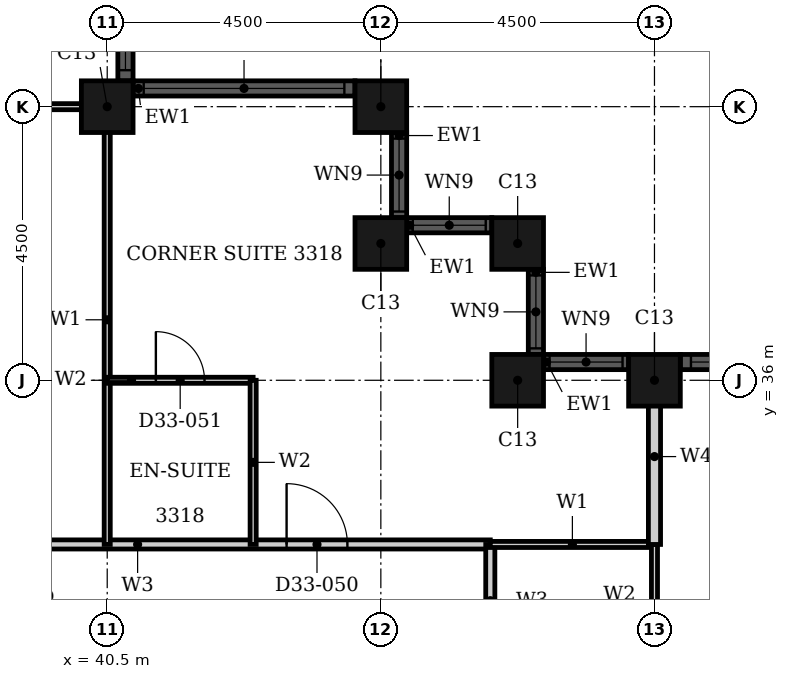
"""IFC4 building model, lengths in metres.
Left out: names, types, materials, properties, quantities, classifications, styles, units other than length and angle.
Written with IfcOpenShell. Run it as: python <this file> out.ifc"""

import sys

from ifc_helpers import new_model, si_unit, direction, frame, frame_2d, origin, origin_2d, place, context, subcontext, project, spatial, rectangle, hollow_rectangle, extrude, element, fill, save


model = new_model("IFC4")
c1 = context("Model", 3, precision=1e-05, world=origin(), true_north=direction((0.0, 1.0)))
c2 = subcontext(c1, "Body", "Model", "MODEL_VIEW")
j1 = project(units=[si_unit("LENGTHUNIT", "METRE"), si_unit("PLANEANGLEUNIT", "RADIAN")], contexts=[c1])
p1 = place(None, origin())
s1 = spatial("IfcSite", under=j1, at=p1, CompositionType="ELEMENT")
p2 = place(p1, origin())
s2 = spatial("IfcBuilding", under=s1, at=p2, CompositionType="ELEMENT")
p3 = place(p2, frame((0.0, 0.0, 133.2)))
s3 = spatial("IfcBuildingStorey", under=s2, at=p3, CompositionType="ELEMENT", Elevation=133.2)
for number, where, z_axis, x_axis in (
    (1, (49.5, 36.0, 0.0), (0.0, 0.0, 1.0), (1.0, 0.0, 0.0)),
    (2, (47.25, 36.0, 0.0), (0.0, 0.0, 1.0), (1.0, 0.0, 0.0)),
    (3, (47.25, 38.25, 0.0), (0.0, 0.0, 1.0), (1.0, 0.0, 0.0)),
    (4, (45.0, 38.25, 0.0), (0.0, 0.0, 1.0), (1.0, 0.0, 0.0)),
    (5, (45.0, 40.5, 0.0), (0.0, 0.0, 1.0), (1.0, 0.0, 0.0)),
    (6, (40.5, 40.5, 0.0), (0.0, 0.0, 1.0), (1.0, 0.0, 0.0)),
):
    element("IfcColumn", number, at=place(p3, frame(where, z_axis=z_axis, x_axis=x_axis)), inside=s3, PredefinedType="COLUMN", context=c2, shape_type="SweptSolid", body=[
        extrude(hollow_rectangle(XDim=0.85, YDim=0.85, WallThickness=0.026, at=origin_2d()), origin(), (0.0, 0.0, 1.0), 3.6),
    ])
p4 = place(p3, frame((58.075, 36.3, 0.0), z_axis=(0.0, 0.0, 1.0), x_axis=(-1.0, 0.0, 0.0)))
e7 = element("IfcWall", 7, at=p4, inside=s3, PredefinedType="SOLIDWALL", context=c2, shape_type="SweptSolid", body=[
    extrude(rectangle(XDim=8.15, YDim=0.25, at=frame_2d((4.075, 0.0))), origin(), (0.0, 0.0, 1.0), 3.6),
])
p5 = place(p4, frame((0.175, 0.0, 0.9)))
e8 = element("IfcOpeningElement", 8, at=p5, cuts=e7, PredefinedType="OPENING", context=c2, shape_type="SweptSolid", body=[
    extrude(rectangle(XDim=3.3, YDim=2.08, at=frame_2d((1.65, 1.04))), frame((0.0, 0.135, 0.0), z_axis=(0.0, -1.0, 0.0), x_axis=(1.0, 0.0, 0.0)), (0.0, 0.0, 1.0), 0.27),
])
p6 = place(p4, frame((4.675, 0.0, 0.9)))
e9 = element("IfcOpeningElement", 9, at=p6, cuts=e7, PredefinedType="OPENING", context=c2, shape_type="SweptSolid", body=[
    extrude(rectangle(XDim=3.3, YDim=2.08, at=frame_2d((1.65, 1.04))), frame((0.0, 0.135, 0.0), z_axis=(0.0, -1.0, 0.0), x_axis=(1.0, 0.0, 0.0)), (0.0, 0.0, 1.0), 0.27),
])
p7 = place(p3, frame((49.075, 36.3, 0.0), z_axis=(0.0, 0.0, 1.0), x_axis=(-1.0, 0.0, 0.0)))
e10 = element("IfcWall", 10, at=p7, inside=s3, PredefinedType="SOLIDWALL", context=c2, shape_type="SweptSolid", body=[
    extrude(rectangle(XDim=1.4, YDim=0.25, at=frame_2d((0.7, 0.0))), origin(), (0.0, 0.0, 1.0), 3.6),
])
p8 = place(p7, frame((0.1, 0.0, 0.9)))
e11 = element("IfcOpeningElement", 11, at=p8, cuts=e10, PredefinedType="OPENING", context=c2, shape_type="SweptSolid", body=[
    extrude(rectangle(XDim=1.2, YDim=2.08, at=frame_2d((0.6, 1.04))), frame((0.0, 0.135, 0.0), z_axis=(0.0, -1.0, 0.0), x_axis=(1.0, 0.0, 0.0)), (0.0, 0.0, 1.0), 0.27),
])
p9 = place(p3, frame((47.55, 36.425, 0.0), z_axis=(0.0, 0.0, 1.0), x_axis=(0.0, 1.0, 0.0)))
e12 = element("IfcWall", 12, at=p9, inside=s3, PredefinedType="SOLIDWALL", context=c2, shape_type="SweptSolid", body=[
    extrude(rectangle(XDim=1.4, YDim=0.25, at=frame_2d((0.7, 0.0))), origin(), (0.0, 0.0, 1.0), 3.6),
])
p10 = place(p9, frame((0.1, 0.0, 0.9)))
e13 = element("IfcOpeningElement", 13, at=p10, cuts=e12, PredefinedType="OPENING", context=c2, shape_type="SweptSolid", body=[
    extrude(rectangle(XDim=1.2, YDim=2.08, at=frame_2d((0.6, 1.04))), frame((0.0, 0.135, 0.0), z_axis=(0.0, -1.0, 0.0), x_axis=(1.0, 0.0, 0.0)), (0.0, 0.0, 1.0), 0.27),
])
p11 = place(p3, frame((46.825, 38.55, 0.0), z_axis=(0.0, 0.0, 1.0), x_axis=(-1.0, 0.0, 0.0)))
e14 = element("IfcWall", 14, at=p11, inside=s3, PredefinedType="SOLIDWALL", context=c2, shape_type="SweptSolid", body=[
    extrude(rectangle(XDim=1.4, YDim=0.25, at=frame_2d((0.7, 0.0))), origin(), (0.0, 0.0, 1.0), 3.6),
])
p12 = place(p11, frame((0.1, 0.0, 0.9)))
e15 = element("IfcOpeningElement", 15, at=p12, cuts=e14, PredefinedType="OPENING", context=c2, shape_type="SweptSolid", body=[
    extrude(rectangle(XDim=1.2, YDim=2.08, at=frame_2d((0.6, 1.04))), frame((0.0, 0.135, 0.0), z_axis=(0.0, -1.0, 0.0), x_axis=(1.0, 0.0, 0.0)), (0.0, 0.0, 1.0), 0.27),
])
p13 = place(p3, frame((45.3, 38.675, 0.0), z_axis=(0.0, 0.0, 1.0), x_axis=(0.0, 1.0, 0.0)))
e16 = element("IfcWall", 16, at=p13, inside=s3, PredefinedType="SOLIDWALL", context=c2, shape_type="SweptSolid", body=[
    extrude(rectangle(XDim=1.4, YDim=0.25, at=frame_2d((0.7, 0.0))), origin(), (0.0, 0.0, 1.0), 3.6),
])
p14 = place(p13, frame((0.1, 0.0, 0.9)))
e17 = element("IfcOpeningElement", 17, at=p14, cuts=e16, PredefinedType="OPENING", context=c2, shape_type="SweptSolid", body=[
    extrude(rectangle(XDim=1.2, YDim=2.08, at=frame_2d((0.6, 1.04))), frame((0.0, 0.135, 0.0), z_axis=(0.0, -1.0, 0.0), x_axis=(1.0, 0.0, 0.0)), (0.0, 0.0, 1.0), 0.27),
])
p15 = place(p3, frame((44.575, 40.8, 0.0), z_axis=(0.0, 0.0, 1.0), x_axis=(-1.0, 0.0, 0.0)))
e18 = element("IfcWall", 18, at=p15, inside=s3, PredefinedType="SOLIDWALL", context=c2, shape_type="SweptSolid", body=[
    extrude(rectangle(XDim=3.65, YDim=0.25, at=frame_2d((1.825, 0.0))), origin(), (0.0, 0.0, 1.0), 3.6),
])
p16 = place(p15, frame((0.175, 0.0, 0.9)))
e19 = element("IfcOpeningElement", 19, at=p16, cuts=e18, PredefinedType="OPENING", context=c2, shape_type="SweptSolid", body=[
    extrude(rectangle(XDim=3.3, YDim=2.08, at=frame_2d((1.65, 1.04))), frame((0.0, 0.135, 0.0), z_axis=(0.0, -1.0, 0.0), x_axis=(1.0, 0.0, 0.0)), (0.0, 0.0, 1.0), 0.27),
])
p17 = place(p3, frame((40.8, 40.925, 0.0), z_axis=(0.0, 0.0, 1.0), x_axis=(0.0, 1.0, 0.0)))
e20 = element("IfcWall", 20, at=p17, inside=s3, PredefinedType="SOLIDWALL", context=c2, shape_type="SweptSolid", body=[
    extrude(rectangle(XDim=8.15, YDim=0.25, at=frame_2d((4.075, 0.0))), origin(), (0.0, 0.0, 1.0), 3.6),
])
p18 = place(p17, frame((0.175, 0.0, 0.9)))
e21 = element("IfcOpeningElement", 21, at=p18, cuts=e20, PredefinedType="OPENING", context=c2, shape_type="SweptSolid", body=[
    extrude(rectangle(XDim=3.3, YDim=2.08, at=frame_2d((1.65, 1.04))), frame((0.0, 0.135, 0.0), z_axis=(0.0, -1.0, 0.0), x_axis=(1.0, 0.0, 0.0)), (0.0, 0.0, 1.0), 0.27),
])
p19 = place(p17, frame((4.675, 0.0, 0.9)))
e22 = element("IfcOpeningElement", 22, at=p19, cuts=e20, PredefinedType="OPENING", context=c2, shape_type="SweptSolid", body=[
    extrude(rectangle(XDim=3.3, YDim=2.08, at=frame_2d((1.65, 1.04))), frame((0.0, 0.135, 0.0), z_axis=(0.0, -1.0, 0.0), x_axis=(1.0, 0.0, 0.0)), (0.0, 0.0, 1.0), 0.27),
])
p20 = place(p3, frame((33.3, 33.3, 0.0), z_axis=(0.0, 0.0, 1.0), x_axis=(1.0, 0.0, 0.0)))
e23 = element("IfcWall", 23, at=p20, inside=s3, PredefinedType="PARTITIONING", context=c2, shape_type="SweptSolid", body=[
    extrude(rectangle(XDim=13.5, YDim=0.15, at=frame_2d((6.75, 0.0))), origin(), (0.0, 0.0, 1.0), 3.3),
])
p21 = place(p20, frame((10.15, 0.0, 0.0)))
e24 = element("IfcOpeningElement", 24, at=p21, cuts=e23, PredefinedType="OPENING", context=c2, shape_type="SweptSolid", body=[
    extrude(rectangle(XDim=1.0, YDim=2.1, at=frame_2d((0.5, 1.05))), frame((0.0, 0.085, 0.0), z_axis=(0.0, -1.0, 0.0), x_axis=(1.0, 0.0, 0.0)), (0.0, 0.0, 1.0), 0.17),
])
p22 = place(p20, frame((0.75, 0.0, 0.0)))
e25 = element("IfcOpeningElement", 25, at=p22, cuts=e23, PredefinedType="OPENING", context=c2, shape_type="SweptSolid", body=[
    extrude(rectangle(XDim=0.9, YDim=2.1, at=frame_2d((0.45, 1.05))), frame((0.0, 0.085, 0.0), z_axis=(0.0, -1.0, 0.0), x_axis=(1.0, 0.0, 0.0)), (0.0, 0.0, 1.0), 0.17),
])
p23 = place(p20, frame((4.35, 0.0, 0.0)))
e26 = element("IfcOpeningElement", 26, at=p23, cuts=e23, PredefinedType="OPENING", context=c2, shape_type="SweptSolid", body=[
    extrude(rectangle(XDim=0.9, YDim=2.1, at=frame_2d((0.45, 1.05))), frame((0.0, 0.085, 0.0), z_axis=(0.0, -1.0, 0.0), x_axis=(1.0, 0.0, 0.0)), (0.0, 0.0, 1.0), 0.17),
])
p24 = place(p3, frame((46.8, 28.8, 0.0), z_axis=(0.0, 0.0, 1.0), x_axis=(0.0, 1.0, 0.0)))
e27 = element("IfcWall", 27, at=p24, inside=s3, PredefinedType="PARTITIONING", context=c2, shape_type="SweptSolid", body=[
    extrude(rectangle(XDim=4.5, YDim=0.15, at=frame_2d((2.25, 0.0))), origin(), (0.0, 0.0, 1.0), 3.3),
])
p25 = place(p24, frame((1.75, 0.0, 0.0)))
e28 = element("IfcOpeningElement", 28, at=p25, cuts=e27, PredefinedType="OPENING", context=c2, shape_type="SweptSolid", body=[
    extrude(rectangle(XDim=0.9, YDim=2.1, at=frame_2d((0.45, 1.05))), frame((0.0, 0.085, 0.0), z_axis=(0.0, -1.0, 0.0), x_axis=(1.0, 0.0, 0.0)), (0.0, 0.0, 1.0), 0.17),
])
p26 = place(p3, frame((46.8, 33.3, 0.0), z_axis=(0.0, 0.0, 1.0), x_axis=(1.0, 0.0, 0.0)))
e29 = element("IfcWall", 29, at=p26, inside=s3, PredefinedType="PARTITIONING", context=c2, shape_type="SweptSolid", body=[
    extrude(rectangle(XDim=2.7, YDim=0.1, at=frame_2d((1.35, 0.0))), origin(), (0.0, 0.0, 1.0), 3.3),
])
p27 = place(p3, frame((33.3, 40.5, 0.0), z_axis=(0.0, 0.0, 1.0), x_axis=(1.0, 0.0, 0.0)))
e30 = element("IfcWall", 30, at=p27, inside=s3, PredefinedType="PARTITIONING", context=c2, shape_type="SweptSolid", body=[
    extrude(rectangle(XDim=7.39, YDim=0.1, at=frame_2d((3.695, 0.0))), origin(), (0.0, 0.0, 1.0), 2.38),
])
p28 = place(p3, frame((40.5, 33.3, 0.0), z_axis=(0.0, 0.0, 1.0), x_axis=(0.0, 1.0, 0.0)))
e31 = element("IfcWall", 31, at=p28, inside=s3, PredefinedType="PARTITIONING", context=c2, shape_type="SweptSolid", body=[
    extrude(rectangle(XDim=7.39, YDim=0.1, at=frame_2d((3.695, 0.0))), origin(), (0.0, 0.0, 1.0), 3.3),
])
p29 = place(p3, frame((49.5, 28.8, 0.0), z_axis=(0.0, 0.0, 1.0), x_axis=(0.0, 1.0, 0.0)))
e32 = element("IfcWall", 32, at=p29, inside=s3, PredefinedType="PARTITIONING", context=c2, shape_type="SweptSolid", body=[
    extrude(rectangle(XDim=4.5, YDim=0.1, at=frame_2d((2.25, 0.0))), origin(), (0.0, 0.0, 1.0), 2.38),
])
p30 = place(p3, frame((49.5, 33.3, 0.0), z_axis=(0.0, 0.0, 1.0), x_axis=(0.0, 1.0, 0.0)))
e33 = element("IfcWall", 33, at=p30, inside=s3, PredefinedType="PARTITIONING", context=c2, shape_type="SweptSolid", body=[
    extrude(rectangle(XDim=2.89, YDim=0.2, at=frame_2d((1.445, 0.0))), origin(), (0.0, 0.0, 1.0), 2.38),
])
p31 = place(p3, frame((40.5, 36.0, 0.0), z_axis=(0.0, 0.0, 1.0), x_axis=(1.0, 0.0, 0.0)))
e34 = element("IfcWall", 34, at=p31, inside=s3, PredefinedType="PARTITIONING", context=c2, shape_type="SweptSolid", body=[
    extrude(rectangle(XDim=2.4, YDim=0.1, at=frame_2d((1.2, 0.0))), origin(), (0.0, 0.0, 1.0), 3.3),
])
p32 = place(p31, frame((0.8, 0.0, 0.0)))
e35 = element("IfcOpeningElement", 35, at=p32, cuts=e34, PredefinedType="OPENING", context=c2, shape_type="SweptSolid", body=[
    extrude(rectangle(XDim=0.8, YDim=2.1, at=frame_2d((0.4, 1.05))), frame((0.0, 0.06, 0.0), z_axis=(0.0, -1.0, 0.0), x_axis=(1.0, 0.0, 0.0)), (0.0, 0.0, 1.0), 0.12),
])
p33 = place(p3, frame((42.9, 33.3, 0.0), z_axis=(0.0, 0.0, 1.0), x_axis=(0.0, 1.0, 0.0)))
e36 = element("IfcWall", 36, at=p33, inside=s3, PredefinedType="PARTITIONING", context=c2, shape_type="SweptSolid", body=[
    extrude(rectangle(XDim=2.7, YDim=0.1, at=frame_2d((1.35, 0.0))), origin(), (0.0, 0.0, 1.0), 3.3),
])
p34 = place(p6, origin())
e37 = element("IfcWindow", 37, at=p34, inside=s3, PartitioningType="SINGLE_PANEL", PredefinedType="WINDOW", context=c2, shape_type="SweptSolid", body=[
    extrude(rectangle(XDim=3.3, YDim=2.08, at=frame_2d((1.65, 1.04))), frame((0.0, 0.03, 0.0), z_axis=(0.0, -1.0, 0.0), x_axis=(1.0, 0.0, 0.0)), (0.0, 0.0, 1.0), 0.06),
])
fill(e9, e37)
p35 = place(p8, origin())
e38 = element("IfcWindow", 38, at=p35, inside=s3, PartitioningType="SINGLE_PANEL", PredefinedType="WINDOW", context=c2, shape_type="SweptSolid", body=[
    extrude(rectangle(XDim=1.2, YDim=2.08, at=frame_2d((0.6, 1.04))), frame((0.0, 0.03, 0.0), z_axis=(0.0, -1.0, 0.0), x_axis=(1.0, 0.0, 0.0)), (0.0, 0.0, 1.0), 0.06),
])
fill(e11, e38)
p36 = place(p10, origin())
e39 = element("IfcWindow", 39, at=p36, inside=s3, PartitioningType="SINGLE_PANEL", PredefinedType="WINDOW", context=c2, shape_type="SweptSolid", body=[
    extrude(rectangle(XDim=1.2, YDim=2.08, at=frame_2d((0.6, 1.04))), frame((0.0, 0.03, 0.0), z_axis=(0.0, -1.0, 0.0), x_axis=(1.0, 0.0, 0.0)), (0.0, 0.0, 1.0), 0.06),
])
fill(e13, e39)
p37 = place(p12, origin())
e40 = element("IfcWindow", 40, at=p37, inside=s3, PartitioningType="SINGLE_PANEL", PredefinedType="WINDOW", context=c2, shape_type="SweptSolid", body=[
    extrude(rectangle(XDim=1.2, YDim=2.08, at=frame_2d((0.6, 1.04))), frame((0.0, 0.03, 0.0), z_axis=(0.0, -1.0, 0.0), x_axis=(1.0, 0.0, 0.0)), (0.0, 0.0, 1.0), 0.06),
])
fill(e15, e40)
p38 = place(p14, origin())
e41 = element("IfcWindow", 41, at=p38, inside=s3, PartitioningType="SINGLE_PANEL", PredefinedType="WINDOW", context=c2, shape_type="SweptSolid", body=[
    extrude(rectangle(XDim=1.2, YDim=2.08, at=frame_2d((0.6, 1.04))), frame((0.0, 0.03, 0.0), z_axis=(0.0, -1.0, 0.0), x_axis=(1.0, 0.0, 0.0)), (0.0, 0.0, 1.0), 0.06),
])
fill(e17, e41)
p39 = place(p16, origin())
e42 = element("IfcWindow", 42, at=p39, inside=s3, PartitioningType="SINGLE_PANEL", PredefinedType="WINDOW", context=c2, shape_type="SweptSolid", body=[
    extrude(rectangle(XDim=3.3, YDim=2.08, at=frame_2d((1.65, 1.04))), frame((0.0, 0.03, 0.0), z_axis=(0.0, -1.0, 0.0), x_axis=(1.0, 0.0, 0.0)), (0.0, 0.0, 1.0), 0.06),
])
fill(e19, e42)
p40 = place(p18, origin())
e43 = element("IfcWindow", 43, at=p40, inside=s3, PartitioningType="SINGLE_PANEL", PredefinedType="WINDOW", context=c2, shape_type="SweptSolid", body=[
    extrude(rectangle(XDim=3.3, YDim=2.08, at=frame_2d((1.65, 1.04))), frame((0.0, 0.03, 0.0), z_axis=(0.0, -1.0, 0.0), x_axis=(1.0, 0.0, 0.0)), (0.0, 0.0, 1.0), 0.06),
])
fill(e21, e43)
p41 = place(p21, origin())
e44 = element("IfcDoor", 44, at=p41, inside=s3, OperationType="SINGLE_SWING_RIGHT", PredefinedType="DOOR", context=c2, shape_type="SweptSolid", body=[
    extrude(rectangle(XDim=1.0, YDim=2.1, at=frame_2d((0.5, 1.05))), frame((0.0, 0.025, 0.0), z_axis=(0.0, -1.0, 0.0), x_axis=(1.0, 0.0, 0.0)), (0.0, 0.0, 1.0), 0.05),
])
fill(e24, e44)
p42 = place(p32, origin())
e45 = element("IfcDoor", 45, at=p42, inside=s3, OperationType="SINGLE_SWING_LEFT", PredefinedType="DOOR", context=c2, shape_type="SweptSolid", body=[
    extrude(rectangle(XDim=0.8, YDim=2.1, at=frame_2d((0.4, 1.05))), frame((0.0, 0.025, 0.0), z_axis=(0.0, -1.0, 0.0), x_axis=(1.0, 0.0, 0.0)), (0.0, 0.0, 1.0), 0.05),
])
fill(e35, e45)
save(model, sys.argv[1])
